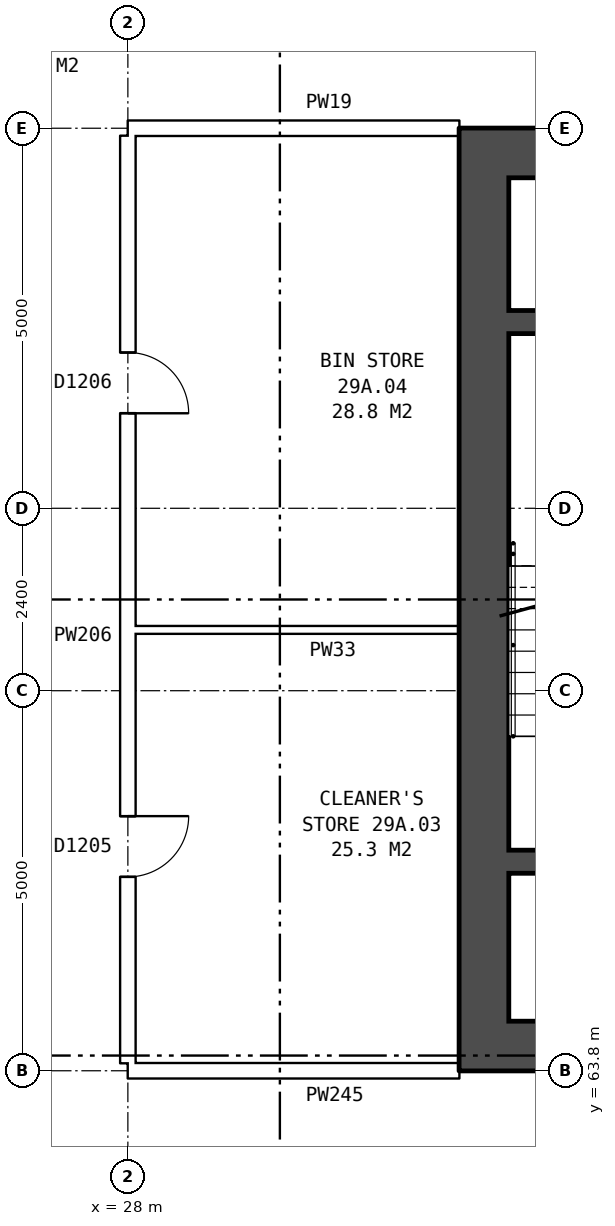
"""IFC4 building model, lengths in metres.
Left out: names, types, materials, properties, quantities, classifications, styles, units other than length and angle.
Written with IfcOpenShell. Run it as: python <this file> out.ifc"""

import sys

from ifc_helpers import new_model, si_unit, direction, frame, frame_2d, origin, place, context, subcontext, project, spatial, rectangle, extrude, element, fill, save


model = new_model("IFC4")
c1 = context("Model", 3, precision=1e-05, world=origin(), true_north=direction((0.0, 1.0)))
c2 = subcontext(c1, "Body", "Model", "MODEL_VIEW")
j1 = project(units=[si_unit("LENGTHUNIT", "METRE"), si_unit("PLANEANGLEUNIT", "RADIAN")], contexts=[c1])
p1 = place(None, origin())
s1 = spatial("IfcSite", under=j1, at=p1, CompositionType="ELEMENT")
p2 = place(p1, origin())
s2 = spatial("IfcBuilding", under=s1, at=p2, CompositionType="ELEMENT")
p3 = place(p2, frame((0.0, 0.0, 105.7)))
s3 = spatial("IfcBuildingStorey", under=s2, at=p3, CompositionType="ELEMENT", Elevation=105.7)
p4 = place(p3, frame((32.685, 75.55, 0.0), z_axis=(0.0, 0.0, 1.0), x_axis=(0.0, -1.0, 0.0)))
e1 = element("IfcWall", 1, at=p4, inside=s3, PredefinedType="SHEAR", context=c2, shape_type="SweptSolid", body=[
    extrude(rectangle(XDim=11.1, YDim=0.65, at=frame_2d((5.55, 0.0))), origin(), (0.0, 0.0, 1.0), 2.85),
])
for number, where, z_axis, x_axis in (
    (2, (41.36, 75.875, 0.0), (0.0, 0.0, 1.0), (-1.0, 0.0, 0.0)),
    (3, (41.36, 64.125, 0.0), (0.0, 0.0, 1.0), (-1.0, 0.0, 0.0)),
):
    element("IfcWall", number, at=place(p3, frame(where, z_axis=z_axis, x_axis=x_axis)), inside=s3, PredefinedType="SHEAR", context=c2, shape_type="SweptSolid", body=[
        extrude(rectangle(XDim=9.0, YDim=0.65, at=frame_2d((4.5, 0.0))), origin(), (0.0, 0.0, 1.0), 2.85),
    ])
p5 = place(p3, frame((36.06, 73.65, 0.0), z_axis=(0.0, 0.0, 1.0), x_axis=(-1.0, 0.0, 0.0)))
e4 = element("IfcWall", 4, at=p5, inside=s3, PredefinedType="SHEAR", context=c2, shape_type="SweptSolid", body=[
    extrude(rectangle(XDim=3.05, YDim=0.3, at=frame_2d((1.525, 0.0))), origin(), (0.0, 0.0, 1.0), 2.85),
])
p6 = place(p3, frame((36.06, 66.55, 0.0), z_axis=(0.0, 0.0, 1.0), x_axis=(-1.0, 0.0, 0.0)))
e5 = element("IfcWall", 5, at=p6, inside=s3, PredefinedType="SHEAR", context=c2, shape_type="SweptSolid", body=[
    extrude(rectangle(XDim=3.05, YDim=0.3, at=frame_2d((1.525, 0.0))), origin(), (0.0, 0.0, 1.0), 2.85),
])
p7 = place(p6, frame((0.17, 0.0, 0.0)))
e6 = element("IfcOpeningElement", 6, at=p7, cuts=e5, PredefinedType="OPENING", context=c2, shape_type="SweptSolid", body=[
    extrude(rectangle(XDim=1.1, YDim=2.1, at=frame_2d((0.55, 1.05))), frame((0.0, 0.16, 0.0), z_axis=(0.0, -1.0, 0.0), x_axis=(1.0, 0.0, 0.0)), (0.0, 0.0, 1.0), 0.32),
])
p8 = place(p3, frame((28.0, 63.8, 0.0), z_axis=(0.0, 0.0, 1.0), x_axis=(1.0, 0.0, 0.0)))
e7 = element("IfcWall", 7, at=p8, inside=s3, PredefinedType="PARTITIONING", context=c2, shape_type="SweptSolid", body=[
    extrude(rectangle(XDim=4.36, YDim=0.2, at=frame_2d((2.18, 0.0))), origin(), (0.0, 0.0, 1.0), 2.85),
])
p9 = place(p3, frame((28.1, 69.6, 0.0), z_axis=(0.0, 0.0, 1.0), x_axis=(1.0, 0.0, 0.0)))
e8 = element("IfcWall", 8, at=p9, inside=s3, PredefinedType="PARTITIONING", context=c2, shape_type="SweptSolid", body=[
    extrude(rectangle(XDim=4.26, YDim=0.1, at=frame_2d((2.13, 0.0))), origin(), (0.0, 0.0, 1.0), 2.85),
])
p10 = place(p3, frame((28.0, 76.2, 0.0), z_axis=(0.0, 0.0, 1.0), x_axis=(1.0, 0.0, 0.0)))
e9 = element("IfcWall", 9, at=p10, inside=s3, PredefinedType="PARTITIONING", context=c2, shape_type="SweptSolid", body=[
    extrude(rectangle(XDim=4.36, YDim=0.2, at=frame_2d((2.18, 0.0))), origin(), (0.0, 0.0, 1.0), 2.85),
])
p11 = place(p3, frame((28.0, 63.9, 0.0), z_axis=(0.0, 0.0, 1.0), x_axis=(0.0, 1.0, 0.0)))
e10 = element("IfcWall", 10, at=p11, inside=s3, PredefinedType="PARTITIONING", context=c2, shape_type="SweptSolid", body=[
    extrude(rectangle(XDim=12.2, YDim=0.2, at=frame_2d((6.1, 0.0))), origin(), (0.0, 0.0, 1.0), 2.85),
])
p12 = place(p11, frame((2.45, 0.0, 0.0)))
e11 = element("IfcOpeningElement", 11, at=p12, cuts=e10, PredefinedType="OPENING", context=c2, shape_type="SweptSolid", body=[
    extrude(rectangle(XDim=0.8, YDim=2.1, at=frame_2d((0.4, 1.05))), frame((0.0, 0.11, 0.0), z_axis=(0.0, -1.0, 0.0), x_axis=(1.0, 0.0, 0.0)), (0.0, 0.0, 1.0), 0.22),
])
p13 = place(p11, frame((8.55, 0.0, 0.0)))
e12 = element("IfcOpeningElement", 12, at=p13, cuts=e10, PredefinedType="OPENING", context=c2, shape_type="SweptSolid", body=[
    extrude(rectangle(XDim=0.8, YDim=2.1, at=frame_2d((0.4, 1.05))), frame((0.0, 0.11, 0.0), z_axis=(0.0, -1.0, 0.0), x_axis=(1.0, 0.0, 0.0)), (0.0, 0.0, 1.0), 0.22),
])
p14 = place(p12, frame((0.8, 0.0, 0.0), z_axis=(0.0, 0.0, 1.0), x_axis=(-1.0, 0.0, 0.0)))
e13 = element("IfcDoor", 13, at=p14, inside=s3, OperationType="SINGLE_SWING_LEFT", PredefinedType="DOOR", context=c2, shape_type="SweptSolid", body=[
    extrude(rectangle(XDim=0.8, YDim=2.1, at=frame_2d((0.4, 1.05))), frame((0.0, 0.025, 0.0), z_axis=(0.0, -1.0, 0.0), x_axis=(1.0, 0.0, 0.0)), (0.0, 0.0, 1.0), 0.05),
])
fill(e11, e13)
p15 = place(p13, frame((0.8, 0.0, 0.0), z_axis=(0.0, 0.0, 1.0), x_axis=(-1.0, 0.0, 0.0)))
e14 = element("IfcDoor", 14, at=p15, inside=s3, OperationType="SINGLE_SWING_RIGHT", PredefinedType="DOOR", context=c2, shape_type="SweptSolid", body=[
    extrude(rectangle(XDim=0.8, YDim=2.1, at=frame_2d((0.4, 1.05))), frame((0.0, 0.025, 0.0), z_axis=(0.0, -1.0, 0.0), x_axis=(1.0, 0.0, 0.0)), (0.0, 0.0, 1.0), 0.05),
])
fill(e12, e14)
save(model, sys.argv[1])
